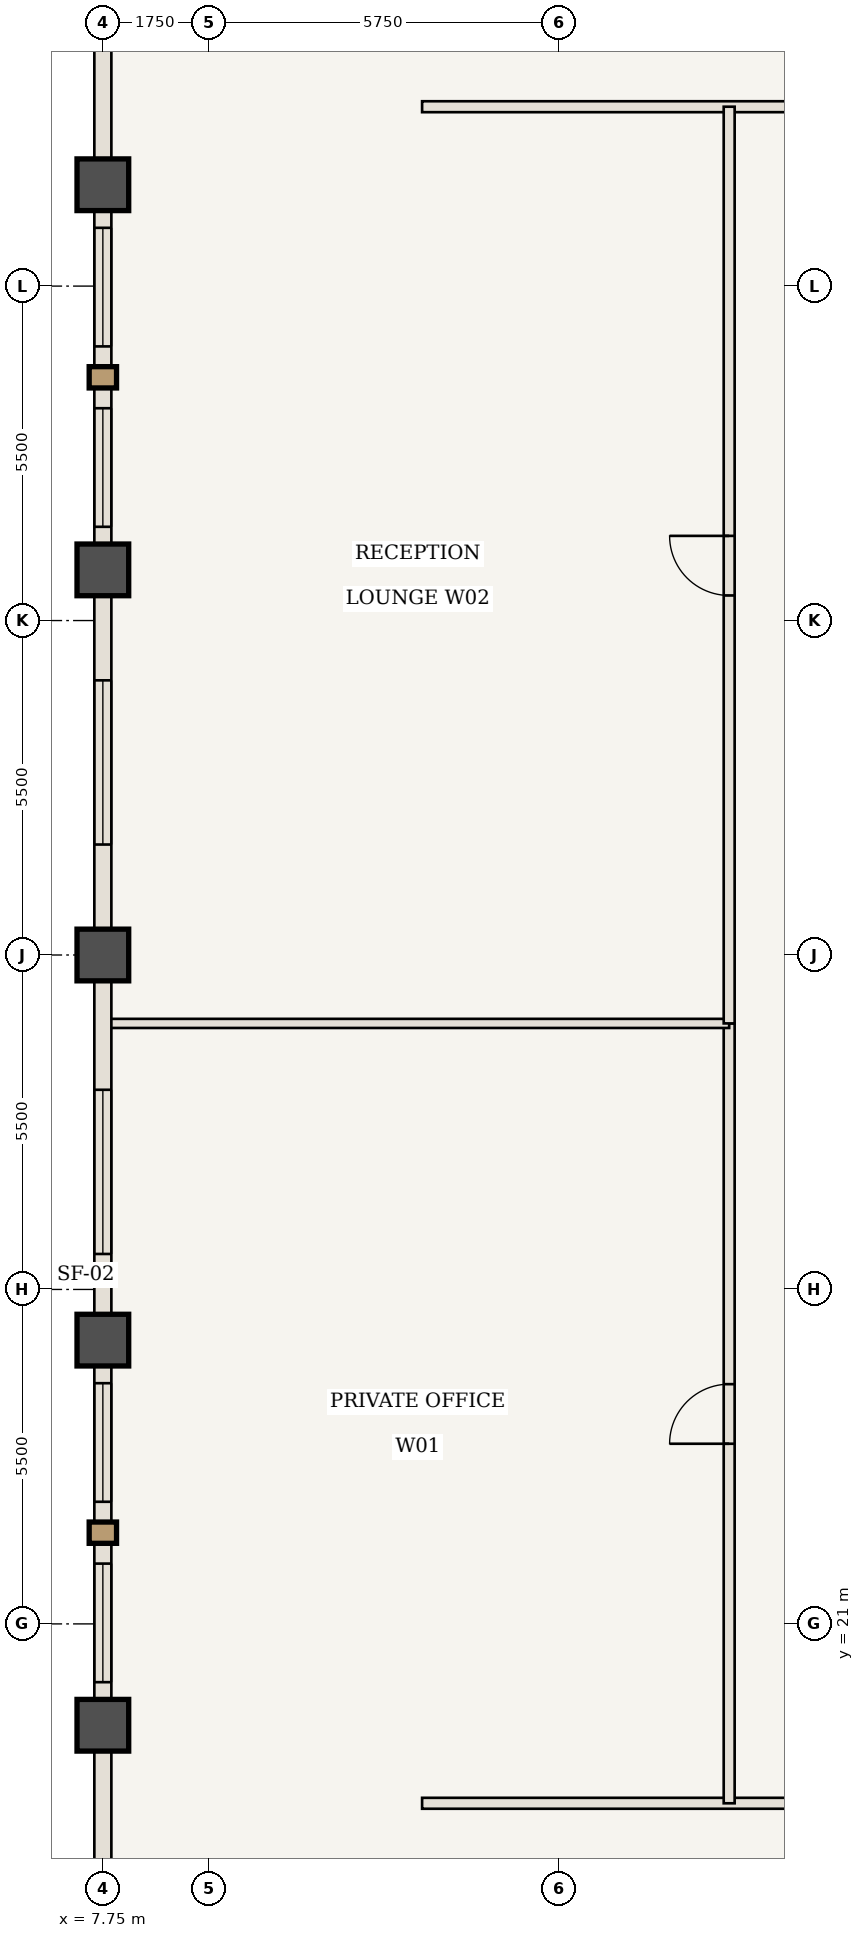
"""IFC4 building model, lengths in metres.
Left out: names, types, materials, properties, quantities, classifications, styles, units other than length and angle.
Written with IfcOpenShell. Run it as: python <this file> out.ifc"""

import sys

from ifc_helpers import new_model, si_unit, direction, frame, frame_2d, origin, origin_2d, place, context, subcontext, project, spatial, rectangle, extrude, element, fill, save


model = new_model("IFC4")
c1 = context("Model", 3, precision=1e-05, world=origin(), true_north=direction((0.0, 1.0)))
c2 = subcontext(c1, "Body", "Model", "MODEL_VIEW")
j1 = project(units=[si_unit("LENGTHUNIT", "METRE"), si_unit("PLANEANGLEUNIT", "RADIAN")], contexts=[c1])
p1 = place(None, origin())
s1 = spatial("IfcSite", under=j1, at=p1, CompositionType="ELEMENT")
p2 = place(p1, origin())
s2 = spatial("IfcBuilding", under=s1, at=p2, CompositionType="ELEMENT")
p3 = place(p2, frame((0.0, 0.0, 206.15)))
s3 = spatial("IfcBuildingStorey", under=s2, at=p3, CompositionType="ELEMENT", Elevation=206.15)
for number, where, z_axis, x_axis in (
    (1, (7.75, 19.333, 0.0), (0.0, 0.0, 1.0), (1.0, 0.0, 0.0)),
    (2, (7.75, 25.667, 0.0), (0.0, 0.0, 1.0), (1.0, 0.0, 0.0)),
    (3, (7.75, 32.0, 0.0), (0.0, 0.0, 1.0), (1.0, 0.0, 0.0)),
    (4, (7.75, 38.333, 0.0), (0.0, 0.0, 1.0), (1.0, 0.0, 0.0)),
    (5, (7.75, 44.667, 0.0), (0.0, 0.0, 1.0), (1.0, 0.0, 0.0)),
):
    element("IfcColumn", number, at=place(p3, frame(where, z_axis=z_axis, x_axis=x_axis)), inside=s3, PredefinedType="COLUMN", context=c2, shape_type="SweptSolid", body=[
        extrude(rectangle(XDim=0.85, YDim=0.85, at=origin_2d()), origin(), (0.0, 0.0, 1.0), 3.85),
    ])
p4 = place(p3, frame((13.0, 18.05, 0.0), z_axis=(0.0, 0.0, 1.0), x_axis=(1.0, 0.0, 0.0)))
e6 = element("IfcWall", 6, at=p4, inside=s3, PredefinedType="STANDARD", context=c2, shape_type="SweptSolid", body=[
    extrude(rectangle(XDim=13.242, YDim=0.18, at=frame_2d((6.621, 0.0))), origin(), (0.0, 0.0, 1.0), 3.685),
])
p5 = place(p4, frame((8.646, 0.0, 0.0)))
e7 = element("IfcOpeningElement", 7, at=p5, cuts=e6, PredefinedType="OPENING", context=c2, shape_type="SweptSolid", body=[
    extrude(rectangle(XDim=0.98, YDim=2.2, at=frame_2d((0.49, 1.1))), frame((0.0, 0.1, 0.0), z_axis=(0.0, -1.0, 0.0), x_axis=(1.0, 0.0, 0.0)), (0.0, 0.0, 1.0), 0.2),
])
p6 = place(p3, frame((13.0, 45.95, 0.0), z_axis=(0.0, 0.0, 1.0), x_axis=(1.0, 0.0, 0.0)))
e8 = element("IfcWall", 8, at=p6, inside=s3, PredefinedType="STANDARD", context=c2, shape_type="SweptSolid", body=[
    extrude(rectangle(XDim=13.592, YDim=0.18, at=frame_2d((6.796, 0.0))), origin(), (0.0, 0.0, 1.0), 3.685),
])
p7 = place(p6, frame((8.821, 0.0, 0.0)))
e9 = element("IfcOpeningElement", 9, at=p7, cuts=e8, PredefinedType="OPENING", context=c2, shape_type="SweptSolid", body=[
    extrude(rectangle(XDim=0.98, YDim=2.2, at=frame_2d((0.49, 1.1))), frame((0.0, 0.1, 0.0), z_axis=(0.0, -1.0, 0.0), x_axis=(1.0, 0.0, 0.0)), (0.0, 0.0, 1.0), 0.2),
])
p8 = place(p3, frame((18.05, 18.05, 0.0), z_axis=(0.0, 0.0, 1.0), x_axis=(0.0, 1.0, 0.0)))
e10 = element("IfcWall", 10, at=p8, inside=s3, PredefinedType="STANDARD", context=c2, shape_type="SweptSolid", body=[
    extrude(rectangle(XDim=12.825, YDim=0.18, at=frame_2d((6.413, 0.0))), origin(), (0.0, 0.0, 1.0), 3.685),
])
p9 = place(p8, frame((5.913, 0.0, 0.0)))
e11 = element("IfcOpeningElement", 11, at=p9, cuts=e10, PredefinedType="OPENING", context=c2, shape_type="SweptSolid", body=[
    extrude(rectangle(XDim=0.98, YDim=2.2, at=frame_2d((0.49, 1.1))), frame((0.0, 0.1, 0.0), z_axis=(0.0, -1.0, 0.0), x_axis=(1.0, 0.0, 0.0)), (0.0, 0.0, 1.0), 0.2),
])
p10 = place(p3, frame((7.81, 30.875, 0.0), z_axis=(0.0, 0.0, 1.0), x_axis=(1.0, 0.0, 0.0)))
e12 = element("IfcWall", 12, at=p10, inside=s3, PredefinedType="STANDARD", context=c2, shape_type="SweptSolid", body=[
    extrude(rectangle(XDim=10.24, YDim=0.15, at=frame_2d((5.12, 0.0))), origin(), (0.0, 0.0, 1.0), 3.685),
])
p11 = place(p3, frame((18.05, 30.875, 0.0), z_axis=(0.0, 0.0, 1.0), x_axis=(0.0, 1.0, 0.0)))
e13 = element("IfcWall", 13, at=p11, inside=s3, PredefinedType="STANDARD", context=c2, shape_type="SweptSolid", body=[
    extrude(rectangle(XDim=15.075, YDim=0.18, at=frame_2d((7.538, 0.0))), origin(), (0.0, 0.0, 1.0), 3.685),
])
p12 = place(p11, frame((7.038, 0.0, 0.0)))
e14 = element("IfcOpeningElement", 14, at=p12, cuts=e13, PredefinedType="OPENING", context=c2, shape_type="SweptSolid", body=[
    extrude(rectangle(XDim=0.98, YDim=2.2, at=frame_2d((0.49, 1.1))), frame((0.0, 0.1, 0.0), z_axis=(0.0, -1.0, 0.0), x_axis=(1.0, 0.0, 0.0)), (0.0, 0.0, 1.0), 0.2),
])
p13 = place(p3, frame((7.75, 13.0, 0.0), z_axis=(0.0, 0.0, 1.0), x_axis=(0.0, 1.0, 0.0)))
e15 = element("IfcWall", 15, at=p13, inside=s3, PredefinedType="USERDEFINED", context=c2, shape_type="SweptSolid", body=[
    extrude(rectangle(XDim=6.333, YDim=0.28, at=frame_2d((3.167, 0.0))), origin(), (0.0, 0.0, 1.0), 2.985),
])
p14 = place(p3, frame((7.75, 19.333, 0.0), z_axis=(0.0, 0.0, 1.0), x_axis=(0.0, 1.0, 0.0)))
e16 = element("IfcWall", 16, at=p14, inside=s3, PredefinedType="USERDEFINED", context=c2, shape_type="SweptSolid", body=[
    extrude(rectangle(XDim=6.333, YDim=0.28, at=frame_2d((3.167, 0.0))), origin(), (0.0, 0.0, 1.0), 2.985),
])
p15 = place(p14, frame((0.708, 0.0, 0.85)))
e17 = element("IfcOpeningElement", 17, at=p15, cuts=e16, PredefinedType="OPENING", context=c2, shape_type="SweptSolid", body=[
    extrude(rectangle(XDim=1.95, YDim=1.935, at=frame_2d((0.975, 0.968))), frame((0.0, 0.15, 0.0), z_axis=(0.0, -1.0, 0.0), x_axis=(1.0, 0.0, 0.0)), (0.0, 0.0, 1.0), 0.3),
])
p16 = place(p14, frame((3.675, 0.0, 0.85)))
e18 = element("IfcOpeningElement", 18, at=p16, cuts=e16, PredefinedType="OPENING", context=c2, shape_type="SweptSolid", body=[
    extrude(rectangle(XDim=1.95, YDim=1.935, at=frame_2d((0.975, 0.968))), frame((0.0, 0.15, 0.0), z_axis=(0.0, -1.0, 0.0), x_axis=(1.0, 0.0, 0.0)), (0.0, 0.0, 1.0), 0.3),
])
p17 = place(p3, frame((7.75, 25.667, 0.0), z_axis=(0.0, 0.0, 1.0), x_axis=(0.0, 1.0, 0.0)))
e19 = element("IfcWall", 19, at=p17, inside=s3, PredefinedType="USERDEFINED", context=c2, shape_type="SweptSolid", body=[
    extrude(rectangle(XDim=6.333, YDim=0.28, at=frame_2d((3.167, 0.0))), origin(), (0.0, 0.0, 1.0), 2.985),
])
p18 = place(p17, frame((1.417, 0.0, 0.85)))
e20 = element("IfcOpeningElement", 20, at=p18, cuts=e19, PredefinedType="OPENING", context=c2, shape_type="SweptSolid", body=[
    extrude(rectangle(XDim=2.7, YDim=1.935, at=frame_2d((1.35, 0.968))), frame((0.0, 0.15, 0.0), z_axis=(0.0, -1.0, 0.0), x_axis=(1.0, 0.0, 0.0)), (0.0, 0.0, 1.0), 0.3),
])
p19 = place(p3, frame((7.75, 32.0, 0.0), z_axis=(0.0, 0.0, 1.0), x_axis=(0.0, 1.0, 0.0)))
e21 = element("IfcWall", 21, at=p19, inside=s3, PredefinedType="USERDEFINED", context=c2, shape_type="SweptSolid", body=[
    extrude(rectangle(XDim=6.333, YDim=0.28, at=frame_2d((3.167, 0.0))), origin(), (0.0, 0.0, 1.0), 2.985),
])
p20 = place(p19, frame((1.817, 0.0, 0.85)))
e22 = element("IfcOpeningElement", 22, at=p20, cuts=e21, PredefinedType="OPENING", context=c2, shape_type="SweptSolid", body=[
    extrude(rectangle(XDim=2.7, YDim=1.935, at=frame_2d((1.35, 0.968))), frame((0.0, 0.15, 0.0), z_axis=(0.0, -1.0, 0.0), x_axis=(1.0, 0.0, 0.0)), (0.0, 0.0, 1.0), 0.3),
])
p21 = place(p3, frame((7.75, 38.333, 0.0), z_axis=(0.0, 0.0, 1.0), x_axis=(0.0, 1.0, 0.0)))
e23 = element("IfcWall", 23, at=p21, inside=s3, PredefinedType="USERDEFINED", context=c2, shape_type="SweptSolid", body=[
    extrude(rectangle(XDim=6.333, YDim=0.28, at=frame_2d((3.167, 0.0))), origin(), (0.0, 0.0, 1.0), 2.985),
])
p22 = place(p21, frame((0.708, 0.0, 0.85)))
e24 = element("IfcOpeningElement", 24, at=p22, cuts=e23, PredefinedType="OPENING", context=c2, shape_type="SweptSolid", body=[
    extrude(rectangle(XDim=1.95, YDim=1.935, at=frame_2d((0.975, 0.968))), frame((0.0, 0.15, 0.0), z_axis=(0.0, -1.0, 0.0), x_axis=(1.0, 0.0, 0.0)), (0.0, 0.0, 1.0), 0.3),
])
p23 = place(p21, frame((3.675, 0.0, 0.85)))
e25 = element("IfcOpeningElement", 25, at=p23, cuts=e23, PredefinedType="OPENING", context=c2, shape_type="SweptSolid", body=[
    extrude(rectangle(XDim=1.95, YDim=1.935, at=frame_2d((0.975, 0.968))), frame((0.0, 0.15, 0.0), z_axis=(0.0, -1.0, 0.0), x_axis=(1.0, 0.0, 0.0)), (0.0, 0.0, 1.0), 0.3),
])
p24 = place(p3, frame((7.75, 44.667, 0.0), z_axis=(0.0, 0.0, 1.0), x_axis=(0.0, 1.0, 0.0)))
e26 = element("IfcWall", 26, at=p24, inside=s3, PredefinedType="USERDEFINED", context=c2, shape_type="SweptSolid", body=[
    extrude(rectangle(XDim=6.333, YDim=0.28, at=frame_2d((3.167, 0.0))), origin(), (0.0, 0.0, 1.0), 2.985),
])
p25 = place(p9, origin())
e27 = element("IfcDoor", 27, at=p25, inside=s3, OperationType="SINGLE_SWING_LEFT", PredefinedType="DOOR", context=c2, shape_type="SweptSolid", body=[
    extrude(rectangle(XDim=0.98, YDim=2.2, at=frame_2d((0.49, 1.1))), frame((0.0, 0.025, 0.0), z_axis=(0.0, -1.0, 0.0), x_axis=(1.0, 0.0, 0.0)), (0.0, 0.0, 1.0), 0.05),
])
fill(e11, e27)
p26 = place(p12, origin())
e28 = element("IfcDoor", 28, at=p26, inside=s3, OperationType="SINGLE_SWING_RIGHT", PredefinedType="DOOR", context=c2, shape_type="SweptSolid", body=[
    extrude(rectangle(XDim=0.98, YDim=2.2, at=frame_2d((0.49, 1.1))), frame((0.0, 0.025, 0.0), z_axis=(0.0, -1.0, 0.0), x_axis=(1.0, 0.0, 0.0)), (0.0, 0.0, 1.0), 0.05),
])
fill(e14, e28)
p27 = place(p15, origin())
e29 = element("IfcWindow", 29, at=p27, inside=s3, PartitioningType="SINGLE_PANEL", PredefinedType="WINDOW", context=c2, shape_type="SweptSolid", body=[
    extrude(rectangle(XDim=1.95, YDim=1.935, at=frame_2d((0.975, 0.968))), frame((0.0, 0.03, 0.0), z_axis=(0.0, -1.0, 0.0), x_axis=(1.0, 0.0, 0.0)), (0.0, 0.0, 1.0), 0.06),
])
fill(e17, e29)
p28 = place(p16, origin())
e30 = element("IfcWindow", 30, at=p28, inside=s3, PartitioningType="SINGLE_PANEL", PredefinedType="WINDOW", context=c2, shape_type="SweptSolid", body=[
    extrude(rectangle(XDim=1.95, YDim=1.935, at=frame_2d((0.975, 0.968))), frame((0.0, 0.03, 0.0), z_axis=(0.0, -1.0, 0.0), x_axis=(1.0, 0.0, 0.0)), (0.0, 0.0, 1.0), 0.06),
])
fill(e18, e30)
p29 = place(p18, origin())
e31 = element("IfcWindow", 31, at=p29, inside=s3, PartitioningType="SINGLE_PANEL", PredefinedType="WINDOW", context=c2, shape_type="SweptSolid", body=[
    extrude(rectangle(XDim=2.7, YDim=1.935, at=frame_2d((1.35, 0.968))), frame((0.0, 0.03, 0.0), z_axis=(0.0, -1.0, 0.0), x_axis=(1.0, 0.0, 0.0)), (0.0, 0.0, 1.0), 0.06),
])
fill(e20, e31)
p30 = place(p20, origin())
e32 = element("IfcWindow", 32, at=p30, inside=s3, PartitioningType="SINGLE_PANEL", PredefinedType="WINDOW", context=c2, shape_type="SweptSolid", body=[
    extrude(rectangle(XDim=2.7, YDim=1.935, at=frame_2d((1.35, 0.968))), frame((0.0, 0.03, 0.0), z_axis=(0.0, -1.0, 0.0), x_axis=(1.0, 0.0, 0.0)), (0.0, 0.0, 1.0), 0.06),
])
fill(e22, e32)
p31 = place(p22, origin())
e33 = element("IfcWindow", 33, at=p31, inside=s3, PartitioningType="SINGLE_PANEL", PredefinedType="WINDOW", context=c2, shape_type="SweptSolid", body=[
    extrude(rectangle(XDim=1.95, YDim=1.935, at=frame_2d((0.975, 0.968))), frame((0.0, 0.03, 0.0), z_axis=(0.0, -1.0, 0.0), x_axis=(1.0, 0.0, 0.0)), (0.0, 0.0, 1.0), 0.06),
])
fill(e24, e33)
p32 = place(p23, origin())
e34 = element("IfcWindow", 34, at=p32, inside=s3, PartitioningType="SINGLE_PANEL", PredefinedType="WINDOW", context=c2, shape_type="SweptSolid", body=[
    extrude(rectangle(XDim=1.95, YDim=1.935, at=frame_2d((0.975, 0.968))), frame((0.0, 0.03, 0.0), z_axis=(0.0, -1.0, 0.0), x_axis=(1.0, 0.0, 0.0)), (0.0, 0.0, 1.0), 0.06),
])
fill(e25, e34)
save(model, sys.argv[1])
